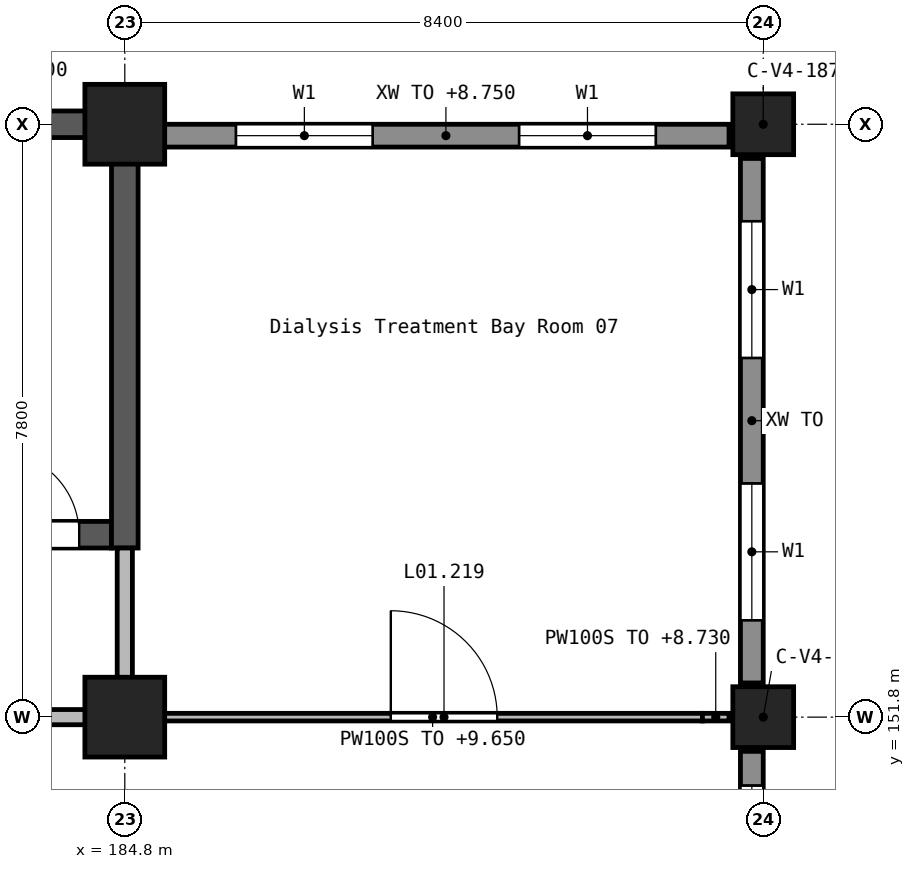
"""IFC4 building model, lengths in metres.
Left out: names, types, materials, properties, quantities, classifications, styles, units other than length and angle.
Written with IfcOpenShell. Run it as: python <this file> out.ifc"""

import sys

from ifc_helpers import new_model, si_unit, direction, frame, frame_2d, origin, origin_2d, place, context, subcontext, project, spatial, rectangle, extrude, element, fill, save


model = new_model("IFC4")
c1 = context("Model", 3, precision=1e-05, world=origin(), true_north=direction((0.0, 1.0)))
c2 = subcontext(c1, "Body", "Model", "MODEL_VIEW")
j1 = project(units=[si_unit("LENGTHUNIT", "METRE"), si_unit("PLANEANGLEUNIT", "RADIAN")], contexts=[c1])
p1 = place(None, origin())
s1 = spatial("IfcSite", under=j1, at=p1, CompositionType="ELEMENT")
p2 = place(p1, origin())
s2 = spatial("IfcBuilding", under=s1, at=p2, CompositionType="ELEMENT")
p3 = place(p2, frame((0.0, 0.0, 5.4)))
s3 = spatial("IfcBuildingStorey", under=s2, at=p3, CompositionType="ELEMENT", Elevation=5.4)
for number, where, z_axis, x_axis in (
    (1, (184.8, 151.8, 0.0), (0.0, 0.0, 1.0), (1.0, 0.0, 0.0)),
    (2, (184.8, 159.6, 0.0), (0.0, 0.0, 1.0), (1.0, 0.0, 0.0)),
):
    element("IfcColumn", number, at=place(p3, frame(where, z_axis=z_axis, x_axis=x_axis)), inside=s3, PredefinedType="COLUMN", context=c2, shape_type="SweptSolid", body=[
        extrude(rectangle(XDim=1.05, YDim=1.05, at=origin_2d()), origin(), (0.0, 0.0, 1.0), 4.5),
    ])
for number, where, z_axis, x_axis in (
    (3, (193.2, 151.8, 0.0), (0.0, 0.0, 1.0), (1.0, 0.0, 0.0)),
    (4, (193.2, 159.6, 0.0), (0.0, 0.0, 1.0), (1.0, 0.0, 0.0)),
):
    element("IfcColumn", number, at=place(p3, frame(where, z_axis=z_axis, x_axis=x_axis)), inside=s3, PredefinedType="COLUMN", context=c2, shape_type="SweptSolid", body=[
        extrude(rectangle(XDim=0.8, YDim=0.8, at=origin_2d()), origin(), (0.0, 0.0, 1.0), 4.5),
    ])
p4 = place(p3, frame((176.225, 159.6, 0.0), z_axis=(0.0, 0.0, 1.0), x_axis=(1.0, 0.0, 0.0)))
e5 = element("IfcWall", 5, at=p4, inside=s3, PredefinedType="SHEAR", context=c2, shape_type="SweptSolid", body=[
    extrude(rectangle(XDim=8.4, YDim=0.35, at=frame_2d((4.2, 0.0))), origin(), (0.0, 0.0, 1.0), 4.5),
])
p5 = place(p3, frame((176.575, 154.2, 0.0), z_axis=(0.0, 0.0, 1.0), x_axis=(1.0, 0.0, 0.0)))
e6 = element("IfcWall", 6, at=p5, inside=s3, PredefinedType="SHEAR", context=c2, shape_type="SweptSolid", body=[
    extrude(rectangle(XDim=8.05, YDim=0.35, at=frame_2d((4.025, 0.0))), origin(), (0.0, 0.0, 1.0), 4.5),
])
p6 = place(p5, frame((6.525, 0.0, 0.0)))
e7 = element("IfcOpeningElement", 7, at=p6, cuts=e6, PredefinedType="OPENING", context=c2, shape_type="SweptSolid", body=[
    extrude(rectangle(XDim=1.1, YDim=2.1, at=frame_2d((0.55, 1.05))), frame((0.0, 0.185, 0.0), z_axis=(0.0, -1.0, 0.0), x_axis=(1.0, 0.0, 0.0)), (0.0, 0.0, 1.0), 0.37),
])
p7 = place(p3, frame((184.8, 154.025, 0.0), z_axis=(0.0, 0.0, 1.0), x_axis=(0.0, 1.0, 0.0)))
e8 = element("IfcWall", 8, at=p7, inside=s3, PredefinedType="SHEAR", context=c2, shape_type="SweptSolid", body=[
    extrude(rectangle(XDim=5.75, YDim=0.35, at=frame_2d((2.875, 0.0))), origin(), (0.0, 0.0, 1.0), 4.5),
])
p8 = place(p3, frame((193.05, 148.65, 0.0), z_axis=(0.0, 0.0, 1.0), x_axis=(0.0, 1.0, 0.0)))
e9 = element("IfcWall", 9, at=p8, inside=s3, PredefinedType="STANDARD", context=c2, shape_type="SweptSolid", body=[
    extrude(rectangle(XDim=2.7, YDim=0.3, at=frame_2d((1.35, 0.0))), origin(), (0.0, 0.0, 1.0), 3.35),
])
p9 = place(p8, frame((0.45, 0.0, 0.9)))
e10 = element("IfcOpeningElement", 10, at=p9, cuts=e9, PredefinedType="OPENING", context=c2, shape_type="SweptSolid", body=[
    extrude(rectangle(XDim=1.8, YDim=1.5, at=frame_2d((0.9, 0.75))), frame((0.0, 0.16, 0.0), z_axis=(0.0, -1.0, 0.0), x_axis=(1.0, 0.0, 0.0)), (0.0, 0.0, 1.0), 0.32),
])
p10 = place(p3, frame((193.05, 152.25, 0.0), z_axis=(0.0, 0.0, 1.0), x_axis=(0.0, 1.0, 0.0)))
e11 = element("IfcWall", 11, at=p10, inside=s3, PredefinedType="STANDARD", context=c2, shape_type="SweptSolid", body=[
    extrude(rectangle(XDim=6.9, YDim=0.3, at=frame_2d((3.45, 0.0))), origin(), (0.0, 0.0, 1.0), 3.35),
])
p11 = place(p10, frame((0.825, 0.0, 0.9)))
e12 = element("IfcOpeningElement", 12, at=p11, cuts=e11, PredefinedType="OPENING", context=c2, shape_type="SweptSolid", body=[
    extrude(rectangle(XDim=1.8, YDim=1.5, at=frame_2d((0.9, 0.75))), frame((0.0, 0.16, 0.0), z_axis=(0.0, -1.0, 0.0), x_axis=(1.0, 0.0, 0.0)), (0.0, 0.0, 1.0), 0.32),
])
p12 = place(p10, frame((4.275, 0.0, 0.9)))
e13 = element("IfcOpeningElement", 13, at=p12, cuts=e11, PredefinedType="OPENING", context=c2, shape_type="SweptSolid", body=[
    extrude(rectangle(XDim=1.8, YDim=1.5, at=frame_2d((0.9, 0.75))), frame((0.0, 0.16, 0.0), z_axis=(0.0, -1.0, 0.0), x_axis=(1.0, 0.0, 0.0)), (0.0, 0.0, 1.0), 0.32),
])
p13 = place(p3, frame((192.75, 159.45, 0.0), z_axis=(0.0, 0.0, 1.0), x_axis=(-1.0, 0.0, 0.0)))
e14 = element("IfcWall", 14, at=p13, inside=s3, PredefinedType="STANDARD", context=c2, shape_type="SweptSolid", body=[
    extrude(rectangle(XDim=7.45, YDim=0.3, at=frame_2d((3.725, 0.0))), origin(), (0.0, 0.0, 1.0), 3.35),
])
p14 = place(p13, frame((0.962, 0.0, 0.9)))
e15 = element("IfcOpeningElement", 15, at=p14, cuts=e14, PredefinedType="OPENING", context=c2, shape_type="SweptSolid", body=[
    extrude(rectangle(XDim=1.8, YDim=1.5, at=frame_2d((0.9, 0.75))), frame((0.0, 0.16, 0.0), z_axis=(0.0, -1.0, 0.0), x_axis=(1.0, 0.0, 0.0)), (0.0, 0.0, 1.0), 0.32),
])
p15 = place(p13, frame((4.688, 0.0, 0.9)))
e16 = element("IfcOpeningElement", 16, at=p15, cuts=e14, PredefinedType="OPENING", context=c2, shape_type="SweptSolid", body=[
    extrude(rectangle(XDim=1.8, YDim=1.5, at=frame_2d((0.9, 0.75))), frame((0.0, 0.16, 0.0), z_axis=(0.0, -1.0, 0.0), x_axis=(1.0, 0.0, 0.0)), (0.0, 0.0, 1.0), 0.32),
])
p16 = place(p3, frame((176.9, 151.8, 0.0), z_axis=(0.0, 0.0, 1.0), x_axis=(1.0, 0.0, 0.0)))
e17 = element("IfcWall", 17, at=p16, inside=s3, PredefinedType="SOLIDWALL", context=c2, shape_type="SweptSolid", body=[
    extrude(rectangle(XDim=7.4, YDim=0.2, at=frame_2d((3.7, 0.0))), origin(), (0.0, 0.0, 1.0), 4.25),
])
p17 = place(p16, frame((3.15, 0.0, 0.0)))
e18 = element("IfcOpeningElement", 18, at=p17, cuts=e17, PredefinedType="OPENING", context=c2, shape_type="SweptSolid", body=[
    extrude(rectangle(XDim=1.1, YDim=2.1, at=frame_2d((0.55, 1.05))), frame((0.0, 0.11, 0.0), z_axis=(0.0, -1.0, 0.0), x_axis=(1.0, 0.0, 0.0)), (0.0, 0.0, 1.0), 0.22),
])
p18 = place(p3, frame((184.8, 152.3, 0.0), z_axis=(0.0, 0.0, 1.0), x_axis=(0.0, 1.0, 0.0)))
e19 = element("IfcWall", 19, at=p18, inside=s3, PredefinedType="SOLIDWALL", context=c2, shape_type="SweptSolid", body=[
    extrude(rectangle(XDim=1.725, YDim=0.2, at=frame_2d((0.862, 0.0))), origin(), (0.0, 0.0, 1.0), 4.25),
])
p19 = place(p3, frame((185.3, 151.8, 0.0), z_axis=(0.0, 0.0, 1.0), x_axis=(1.0, 0.0, 0.0)))
e20 = element("IfcWall", 20, at=p19, inside=s3, PredefinedType="PARTITIONING", context=c2, shape_type="SweptSolid", body=[
    extrude(rectangle(XDim=7.1, YDim=0.1, at=frame_2d((3.55, 0.0))), origin(), (0.0, 0.0, 1.0), 4.25),
])
p20 = place(p19, frame((3.0, 0.0, 0.0)))
e21 = element("IfcOpeningElement", 21, at=p20, cuts=e20, PredefinedType="OPENING", context=c2, shape_type="SweptSolid", body=[
    extrude(rectangle(XDim=1.4, YDim=2.1, at=frame_2d((0.7, 1.05))), frame((0.0, 0.06, 0.0), z_axis=(0.0, -1.0, 0.0), x_axis=(1.0, 0.0, 0.0)), (0.0, 0.0, 1.0), 0.12),
])
p21 = place(p3, frame((192.4, 151.8, 0.0), z_axis=(0.0, 0.0, 1.0), x_axis=(1.0, 0.0, 0.0)))
e22 = element("IfcWall", 22, at=p21, inside=s3, PredefinedType="PARTITIONING", context=c2, shape_type="SweptSolid", body=[
    extrude(rectangle(XDim=0.35, YDim=0.1, at=frame_2d((0.175, 0.0))), origin(), (0.0, 0.0, 1.0), 3.33),
])
p22 = place(p9, origin())
e23 = element("IfcWindow", 23, at=p22, inside=s3, PartitioningType="SINGLE_PANEL", PredefinedType="WINDOW", context=c2, shape_type="SweptSolid", body=[
    extrude(rectangle(XDim=1.8, YDim=1.5, at=frame_2d((0.9, 0.75))), frame((0.0, 0.03, 0.0), z_axis=(0.0, -1.0, 0.0), x_axis=(1.0, 0.0, 0.0)), (0.0, 0.0, 1.0), 0.06),
])
fill(e10, e23)
p23 = place(p11, origin())
e24 = element("IfcWindow", 24, at=p23, inside=s3, PartitioningType="SINGLE_PANEL", PredefinedType="WINDOW", context=c2, shape_type="SweptSolid", body=[
    extrude(rectangle(XDim=1.8, YDim=1.5, at=frame_2d((0.9, 0.75))), frame((0.0, 0.03, 0.0), z_axis=(0.0, -1.0, 0.0), x_axis=(1.0, 0.0, 0.0)), (0.0, 0.0, 1.0), 0.06),
])
fill(e12, e24)
p24 = place(p12, origin())
e25 = element("IfcWindow", 25, at=p24, inside=s3, PartitioningType="SINGLE_PANEL", PredefinedType="WINDOW", context=c2, shape_type="SweptSolid", body=[
    extrude(rectangle(XDim=1.8, YDim=1.5, at=frame_2d((0.9, 0.75))), frame((0.0, 0.03, 0.0), z_axis=(0.0, -1.0, 0.0), x_axis=(1.0, 0.0, 0.0)), (0.0, 0.0, 1.0), 0.06),
])
fill(e13, e25)
p25 = place(p14, origin())
e26 = element("IfcWindow", 26, at=p25, inside=s3, PartitioningType="SINGLE_PANEL", PredefinedType="WINDOW", context=c2, shape_type="SweptSolid", body=[
    extrude(rectangle(XDim=1.8, YDim=1.5, at=frame_2d((0.9, 0.75))), frame((0.0, 0.03, 0.0), z_axis=(0.0, -1.0, 0.0), x_axis=(1.0, 0.0, 0.0)), (0.0, 0.0, 1.0), 0.06),
])
fill(e15, e26)
p26 = place(p15, origin())
e27 = element("IfcWindow", 27, at=p26, inside=s3, PartitioningType="SINGLE_PANEL", PredefinedType="WINDOW", context=c2, shape_type="SweptSolid", body=[
    extrude(rectangle(XDim=1.8, YDim=1.5, at=frame_2d((0.9, 0.75))), frame((0.0, 0.03, 0.0), z_axis=(0.0, -1.0, 0.0), x_axis=(1.0, 0.0, 0.0)), (0.0, 0.0, 1.0), 0.06),
])
fill(e16, e27)
p27 = place(p6, origin())
e28 = element("IfcDoor", 28, at=p27, inside=s3, OperationType="SINGLE_SWING_RIGHT", PredefinedType="DOOR", context=c2, shape_type="SweptSolid", body=[
    extrude(rectangle(XDim=1.1, YDim=2.1, at=frame_2d((0.55, 1.05))), frame((0.0, 0.025, 0.0), z_axis=(0.0, -1.0, 0.0), x_axis=(1.0, 0.0, 0.0)), (0.0, 0.0, 1.0), 0.05),
])
fill(e7, e28)
p28 = place(p20, origin())
e29 = element("IfcDoor", 29, at=p28, inside=s3, OperationType="DOUBLE_DOOR_SINGLE_SWING", PredefinedType="DOOR", context=c2, shape_type="SweptSolid", body=[
    extrude(rectangle(XDim=1.4, YDim=2.1, at=frame_2d((0.7, 1.05))), frame((0.0, 0.025, 0.0), z_axis=(0.0, -1.0, 0.0), x_axis=(1.0, 0.0, 0.0)), (0.0, 0.0, 1.0), 0.05),
])
fill(e21, e29)
save(model, sys.argv[1])
